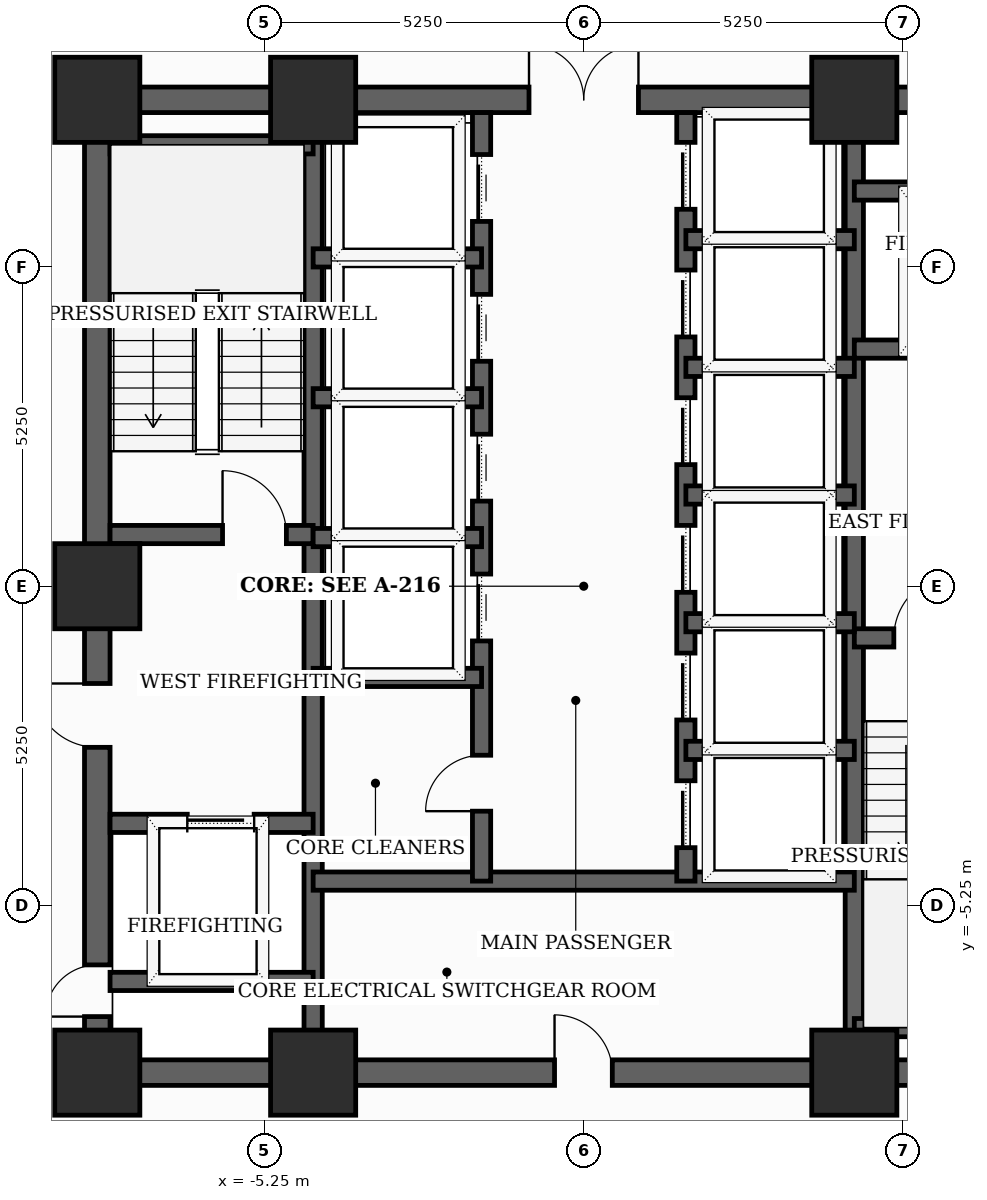
"""IFC4 building model, lengths in metres.
Left out: names, types, materials, properties, quantities, classifications, styles, units other than length and angle.
Written with IfcOpenShell. Run it as: python <this file> out.ifc"""

import sys

from ifc_helpers import new_model, si_unit, direction, frame, frame_2d, origin, origin_2d, place, context, subcontext, project, spatial, rectangle, extrude, element, fill, save


model = new_model("IFC4")
c1 = context("Model", 3, precision=1e-05, world=origin(), true_north=direction((0.0, 1.0)))
c2 = subcontext(c1, "Body", "Model", "MODEL_VIEW")
j1 = project(units=[si_unit("LENGTHUNIT", "METRE"), si_unit("PLANEANGLEUNIT", "RADIAN")], contexts=[c1])
p1 = place(None, origin())
s1 = spatial("IfcSite", under=j1, at=p1, CompositionType="ELEMENT")
p2 = place(p1, origin())
s2 = spatial("IfcBuilding", under=s1, at=p2, CompositionType="ELEMENT")
p3 = place(p2, frame((0.0, 0.0, 90.3)))
s3 = spatial("IfcBuildingStorey", under=s2, at=p3, CompositionType="ELEMENT", Elevation=90.3)
for number, where, z_axis, x_axis in (
    (1, (-8.0, -8.0, 0.0), (0.0, 0.0, 1.0), (1.0, 0.0, 0.0)),
    (2, (-4.45, -8.0, 0.0), (0.0, 0.0, 1.0), (1.0, 0.0, 0.0)),
    (3, (4.45, -8.0, 0.0), (0.0, 0.0, 1.0), (1.0, 0.0, 0.0)),
    (4, (4.45, 8.0, 0.0), (0.0, 0.0, 1.0), (1.0, 0.0, 0.0)),
    (5, (-4.45, 8.0, 0.0), (0.0, 0.0, 1.0), (1.0, 0.0, 0.0)),
    (6, (-8.0, 8.0, 0.0), (0.0, 0.0, 1.0), (1.0, 0.0, 0.0)),
    (7, (-8.0, 0.0, 0.0), (0.0, 0.0, 1.0), (1.0, 0.0, 0.0)),
):
    element("IfcColumn", number, at=place(p3, frame(where, z_axis=z_axis, x_axis=x_axis)), inside=s3, PredefinedType="COLUMN", context=c2, shape_type="SweptSolid", body=[
        extrude(rectangle(XDim=1.4, YDim=1.4, at=origin_2d()), origin(), (0.0, 0.0, 1.0), 3.7),
    ])
p4 = place(p3, frame((-8.0, -8.0, 0.0), z_axis=(0.0, 0.0, 1.0), x_axis=(0.0, 1.0, 0.0)))
e8 = element("IfcWall", 8, at=p4, inside=s3, PredefinedType="SHEAR", context=c2, shape_type="SweptSolid", body=[
    extrude(rectangle(XDim=16.0, YDim=0.42, at=frame_2d((8.0, 0.0))), origin(), (0.0, 0.0, 1.0), 3.5),
])
p5 = place(p4, frame((0.922, 0.0, 0.0)))
e9 = element("IfcOpeningElement", 9, at=p5, cuts=e8, PredefinedType="OPENING", context=c2, shape_type="SweptSolid", body=[
    extrude(rectangle(XDim=0.85, YDim=2.02, at=frame_2d((0.425, 1.01))), frame((0.0, 0.22, 0.0), z_axis=(0.0, -1.0, 0.0), x_axis=(1.0, 0.0, 0.0)), (0.0, 0.0, 1.0), 0.44),
])
p6 = place(p4, frame((5.35, 0.0, 0.0)))
e10 = element("IfcOpeningElement", 10, at=p6, cuts=e8, PredefinedType="OPENING", context=c2, shape_type="SweptSolid", body=[
    extrude(rectangle(XDim=1.05, YDim=2.15, at=frame_2d((0.525, 1.075))), frame((0.0, 0.22, 0.0), z_axis=(0.0, -1.0, 0.0), x_axis=(1.0, 0.0, 0.0)), (0.0, 0.0, 1.0), 0.44),
])
p7 = place(p3, frame((-8.0, -8.0, 0.0), z_axis=(0.0, 0.0, 1.0), x_axis=(1.0, 0.0, 0.0)))
e11 = element("IfcWall", 11, at=p7, inside=s3, PredefinedType="SHEAR", context=c2, shape_type="SweptSolid", body=[
    extrude(rectangle(XDim=16.0, YDim=0.42, at=frame_2d((8.0, 0.0))), origin(), (0.0, 0.0, 1.0), 3.5),
])
p8 = place(p7, frame((7.52, 0.0, 0.0)))
e12 = element("IfcOpeningElement", 12, at=p8, cuts=e11, PredefinedType="OPENING", context=c2, shape_type="SweptSolid", body=[
    extrude(rectangle(XDim=0.95, YDim=2.1, at=frame_2d((0.475, 1.05))), frame((0.0, 0.22, 0.0), z_axis=(0.0, -1.0, 0.0), x_axis=(1.0, 0.0, 0.0)), (0.0, 0.0, 1.0), 0.44),
])
p9 = place(p3, frame((-8.0, 8.0, 0.0), z_axis=(0.0, 0.0, 1.0), x_axis=(1.0, 0.0, 0.0)))
e13 = element("IfcWall", 13, at=p9, inside=s3, PredefinedType="SHEAR", context=c2, shape_type="SweptSolid", body=[
    extrude(rectangle(XDim=16.0, YDim=0.42, at=frame_2d((8.0, 0.0))), origin(), (0.0, 0.0, 1.0), 3.5),
])
p10 = place(p9, frame((7.1, 0.0, 0.0)))
e14 = element("IfcOpeningElement", 14, at=p10, cuts=e13, PredefinedType="OPENING", context=c2, shape_type="SweptSolid", body=[
    extrude(rectangle(XDim=1.8, YDim=2.15, at=frame_2d((0.9, 1.075))), frame((0.0, 0.22, 0.0), z_axis=(0.0, -1.0, 0.0), x_axis=(1.0, 0.0, 0.0)), (0.0, 0.0, 1.0), 0.44),
])
for number, where, z_axis, x_axis in (
    (15, (-4.45, -7.79, 0.0), (0.0, 0.0, 1.0), (0.0, 1.0, 0.0)),
    (16, (4.45, -7.79, 0.0), (0.0, 0.0, 1.0), (0.0, 1.0, 0.0)),
):
    element("IfcWall", number, at=place(p3, frame(where, z_axis=z_axis, x_axis=x_axis)), inside=s3, PredefinedType="SHEAR", context=c2, shape_type="SweptSolid", body=[
        extrude(rectangle(XDim=15.58, YDim=0.3, at=frame_2d((7.79, 0.0))), origin(), (0.0, 0.0, 1.0), 3.5),
    ])
p11 = place(p3, frame((-7.79, 0.85, 0.0), z_axis=(0.0, 0.0, 1.0), x_axis=(1.0, 0.0, 0.0)))
e17 = element("IfcWall", 17, at=p11, inside=s3, PredefinedType="SHEAR", context=c2, shape_type="SweptSolid", body=[
    extrude(rectangle(XDim=3.34, YDim=0.3, at=frame_2d((1.67, 0.0))), origin(), (0.0, 0.0, 1.0), 3.5),
])
p12 = place(p11, frame((1.85, 0.0, 0.0)))
e18 = element("IfcOpeningElement", 18, at=p12, cuts=e17, PredefinedType="OPENING", context=c2, shape_type="SweptSolid", body=[
    extrude(rectangle(XDim=1.05, YDim=2.15, at=frame_2d((0.525, 1.075))), frame((0.0, 0.16, 0.0), z_axis=(0.0, -1.0, 0.0), x_axis=(1.0, 0.0, 0.0)), (0.0, 0.0, 1.0), 0.32),
])
p13 = place(p3, frame((-7.79, 7.26, 0.0), z_axis=(0.0, 0.0, 1.0), x_axis=(1.0, 0.0, 0.0)))
e19 = element("IfcWall", 19, at=p13, inside=s3, PredefinedType="SHEAR", context=c2, shape_type="SweptSolid", body=[
    extrude(rectangle(XDim=3.34, YDim=0.3, at=frame_2d((1.67, 0.0))), origin(), (0.0, 0.0, 1.0), 3.5),
])
p14 = place(p3, frame((4.45, -0.85, 0.0), z_axis=(0.0, 0.0, 1.0), x_axis=(1.0, 0.0, 0.0)))
e20 = element("IfcWall", 20, at=p14, inside=s3, PredefinedType="SHEAR", context=c2, shape_type="SweptSolid", body=[
    extrude(rectangle(XDim=3.34, YDim=0.3, at=frame_2d((1.67, 0.0))), origin(), (0.0, 0.0, 1.0), 3.5),
])
p15 = place(p14, frame((0.65, 0.0, 0.0)))
e21 = element("IfcOpeningElement", 21, at=p15, cuts=e20, PredefinedType="OPENING", context=c2, shape_type="SweptSolid", body=[
    extrude(rectangle(XDim=1.05, YDim=2.15, at=frame_2d((0.525, 1.075))), frame((0.0, 0.16, 0.0), z_axis=(0.0, -1.0, 0.0), x_axis=(1.0, 0.0, 0.0)), (0.0, 0.0, 1.0), 0.32),
])
p16 = place(p3, frame((4.45, -7.26, 0.0), z_axis=(0.0, 0.0, 1.0), x_axis=(1.0, 0.0, 0.0)))
e22 = element("IfcWall", 22, at=p16, inside=s3, PredefinedType="SHEAR", context=c2, shape_type="SweptSolid", body=[
    extrude(rectangle(XDim=3.55, YDim=0.3, at=frame_2d((1.775, 0.0))), origin(), (0.0, 0.0, 1.0), 3.5),
])
p17 = place(p3, frame((-7.79, -3.9, 0.0), z_axis=(0.0, 0.0, 1.0), x_axis=(1.0, 0.0, 0.0)))
e23 = element("IfcWall", 23, at=p17, inside=s3, PredefinedType="SHEAR", context=c2, shape_type="SweptSolid", body=[
    extrude(rectangle(XDim=3.34, YDim=0.3, at=frame_2d((1.67, 0.0))), origin(), (0.0, 0.0, 1.0), 3.5),
])
p18 = place(p17, frame((1.27, 0.0, 0.0)))
e24 = element("IfcOpeningElement", 24, at=p18, cuts=e23, PredefinedType="OPENING", context=c2, shape_type="SweptSolid", body=[
    extrude(rectangle(XDim=1.1, YDim=2.1, at=frame_2d((0.55, 1.05))), frame((0.0, 0.16, 0.0), z_axis=(0.0, -1.0, 0.0), x_axis=(1.0, 0.0, 0.0)), (0.0, 0.0, 1.0), 0.32),
])
p19 = place(p3, frame((-7.79, -6.5, 0.0), z_axis=(0.0, 0.0, 1.0), x_axis=(1.0, 0.0, 0.0)))
e25 = element("IfcWall", 25, at=p19, inside=s3, PredefinedType="SHEAR", context=c2, shape_type="SweptSolid", body=[
    extrude(rectangle(XDim=3.34, YDim=0.3, at=frame_2d((1.67, 0.0))), origin(), (0.0, 0.0, 1.0), 3.5),
])
p20 = place(p3, frame((4.45, 3.9, 0.0), z_axis=(0.0, 0.0, 1.0), x_axis=(1.0, 0.0, 0.0)))
e26 = element("IfcWall", 26, at=p20, inside=s3, PredefinedType="SHEAR", context=c2, shape_type="SweptSolid", body=[
    extrude(rectangle(XDim=3.34, YDim=0.3, at=frame_2d((1.67, 0.0))), origin(), (0.0, 0.0, 1.0), 3.5),
])
p21 = place(p20, frame((1.18, 0.0, 0.0)))
e27 = element("IfcOpeningElement", 27, at=p21, cuts=e26, PredefinedType="OPENING", context=c2, shape_type="SweptSolid", body=[
    extrude(rectangle(XDim=1.1, YDim=2.1, at=frame_2d((0.55, 1.05))), frame((0.0, 0.16, 0.0), z_axis=(0.0, -1.0, 0.0), x_axis=(1.0, 0.0, 0.0)), (0.0, 0.0, 1.0), 0.32),
])
p22 = place(p3, frame((4.45, 6.5, 0.0), z_axis=(0.0, 0.0, 1.0), x_axis=(1.0, 0.0, 0.0)))
e28 = element("IfcWall", 28, at=p22, inside=s3, PredefinedType="SHEAR", context=c2, shape_type="SweptSolid", body=[
    extrude(rectangle(XDim=3.34, YDim=0.3, at=frame_2d((1.67, 0.0))), origin(), (0.0, 0.0, 1.0), 3.5),
])
p23 = place(p3, frame((-4.45, -4.85, 0.0), z_axis=(0.0, 0.0, 1.0), x_axis=(1.0, 0.0, 0.0)))
e29 = element("IfcWall", 29, at=p23, inside=s3, PredefinedType="SHEAR", context=c2, shape_type="SweptSolid", body=[
    extrude(rectangle(XDim=8.9, YDim=0.3, at=frame_2d((4.45, 0.0))), origin(), (0.0, 0.0, 1.0), 3.5),
])
p24 = place(p3, frame((-1.68, -4.85, 0.0), z_axis=(0.0, 0.0, 1.0), x_axis=(0.0, 1.0, 0.0)))
e30 = element("IfcWall", 30, at=p24, inside=s3, PredefinedType="SHEAR", context=c2, shape_type="SweptSolid", body=[
    extrude(rectangle(XDim=12.64, YDim=0.3, at=frame_2d((6.32, 0.0))), origin(), (0.0, 0.0, 1.0), 3.5),
])
p25 = place(p24, frame((3.95, 0.0, 0.0)))
e31 = element("IfcOpeningElement", 31, at=p25, cuts=e30, PredefinedType="OPENING", context=c2, shape_type="SweptSolid", body=[
    extrude(rectangle(XDim=1.1, YDim=2.1, at=frame_2d((0.55, 1.05))), frame((0.0, 0.16, 0.0), z_axis=(0.0, -1.0, 0.0), x_axis=(1.0, 0.0, 0.0)), (0.0, 0.0, 1.0), 0.32),
])
p26 = place(p24, frame((6.25, 0.0, 0.0)))
e32 = element("IfcOpeningElement", 32, at=p26, cuts=e30, PredefinedType="OPENING", context=c2, shape_type="SweptSolid", body=[
    extrude(rectangle(XDim=1.1, YDim=2.1, at=frame_2d((0.55, 1.05))), frame((0.0, 0.16, 0.0), z_axis=(0.0, -1.0, 0.0), x_axis=(1.0, 0.0, 0.0)), (0.0, 0.0, 1.0), 0.32),
])
p27 = place(p24, frame((8.55, 0.0, 0.0)))
e33 = element("IfcOpeningElement", 33, at=p27, cuts=e30, PredefinedType="OPENING", context=c2, shape_type="SweptSolid", body=[
    extrude(rectangle(XDim=1.1, YDim=2.1, at=frame_2d((0.55, 1.05))), frame((0.0, 0.16, 0.0), z_axis=(0.0, -1.0, 0.0), x_axis=(1.0, 0.0, 0.0)), (0.0, 0.0, 1.0), 0.32),
])
p28 = place(p24, frame((10.85, 0.0, 0.0)))
e34 = element("IfcOpeningElement", 34, at=p28, cuts=e30, PredefinedType="OPENING", context=c2, shape_type="SweptSolid", body=[
    extrude(rectangle(XDim=1.1, YDim=2.1, at=frame_2d((0.55, 1.05))), frame((0.0, 0.16, 0.0), z_axis=(0.0, -1.0, 0.0), x_axis=(1.0, 0.0, 0.0)), (0.0, 0.0, 1.0), 0.32),
])
p29 = place(p24, frame((1.15, 0.0, 0.0)))
e35 = element("IfcOpeningElement", 35, at=p29, cuts=e30, PredefinedType="OPENING", context=c2, shape_type="SweptSolid", body=[
    extrude(rectangle(XDim=0.92, YDim=2.1, at=frame_2d((0.46, 1.05))), frame((0.0, 0.16, 0.0), z_axis=(0.0, -1.0, 0.0), x_axis=(1.0, 0.0, 0.0)), (0.0, 0.0, 1.0), 0.32),
])
p30 = place(p3, frame((1.68, -4.85, 0.0), z_axis=(0.0, 0.0, 1.0), x_axis=(0.0, 1.0, 0.0)))
e36 = element("IfcWall", 36, at=p30, inside=s3, PredefinedType="SHEAR", context=c2, shape_type="SweptSolid", body=[
    extrude(rectangle(XDim=12.64, YDim=0.3, at=frame_2d((6.32, 0.0))), origin(), (0.0, 0.0, 1.0), 3.5),
])
p31 = place(p30, frame((0.55, 0.0, 0.0)))
e37 = element("IfcOpeningElement", 37, at=p31, cuts=e36, PredefinedType="OPENING", context=c2, shape_type="SweptSolid", body=[
    extrude(rectangle(XDim=1.1, YDim=2.1, at=frame_2d((0.55, 1.05))), frame((0.0, 0.16, 0.0), z_axis=(0.0, -1.0, 0.0), x_axis=(1.0, 0.0, 0.0)), (0.0, 0.0, 1.0), 0.32),
])
p32 = place(p30, frame((2.65, 0.0, 0.0)))
e38 = element("IfcOpeningElement", 38, at=p32, cuts=e36, PredefinedType="OPENING", context=c2, shape_type="SweptSolid", body=[
    extrude(rectangle(XDim=1.1, YDim=2.1, at=frame_2d((0.55, 1.05))), frame((0.0, 0.16, 0.0), z_axis=(0.0, -1.0, 0.0), x_axis=(1.0, 0.0, 0.0)), (0.0, 0.0, 1.0), 0.32),
])
p33 = place(p30, frame((4.75, 0.0, 0.0)))
e39 = element("IfcOpeningElement", 39, at=p33, cuts=e36, PredefinedType="OPENING", context=c2, shape_type="SweptSolid", body=[
    extrude(rectangle(XDim=1.1, YDim=2.1, at=frame_2d((0.55, 1.05))), frame((0.0, 0.16, 0.0), z_axis=(0.0, -1.0, 0.0), x_axis=(1.0, 0.0, 0.0)), (0.0, 0.0, 1.0), 0.32),
])
p34 = place(p30, frame((6.85, 0.0, 0.0)))
e40 = element("IfcOpeningElement", 40, at=p34, cuts=e36, PredefinedType="OPENING", context=c2, shape_type="SweptSolid", body=[
    extrude(rectangle(XDim=1.1, YDim=2.1, at=frame_2d((0.55, 1.05))), frame((0.0, 0.16, 0.0), z_axis=(0.0, -1.0, 0.0), x_axis=(1.0, 0.0, 0.0)), (0.0, 0.0, 1.0), 0.32),
])
p35 = place(p30, frame((8.95, 0.0, 0.0)))
e41 = element("IfcOpeningElement", 41, at=p35, cuts=e36, PredefinedType="OPENING", context=c2, shape_type="SweptSolid", body=[
    extrude(rectangle(XDim=1.1, YDim=2.1, at=frame_2d((0.55, 1.05))), frame((0.0, 0.16, 0.0), z_axis=(0.0, -1.0, 0.0), x_axis=(1.0, 0.0, 0.0)), (0.0, 0.0, 1.0), 0.32),
])
p36 = place(p30, frame((11.05, 0.0, 0.0)))
e42 = element("IfcOpeningElement", 42, at=p36, cuts=e36, PredefinedType="OPENING", context=c2, shape_type="SweptSolid", body=[
    extrude(rectangle(XDim=1.1, YDim=2.1, at=frame_2d((0.55, 1.05))), frame((0.0, 0.16, 0.0), z_axis=(0.0, -1.0, 0.0), x_axis=(1.0, 0.0, 0.0)), (0.0, 0.0, 1.0), 0.32),
])
for number, where, z_axis, x_axis in (
    (43, (-4.45, -1.5, 0.0), (0.0, 0.0, 1.0), (1.0, 0.0, 0.0)),
    (44, (-4.45, 0.8, 0.0), (0.0, 0.0, 1.0), (1.0, 0.0, 0.0)),
    (45, (-4.45, 3.1, 0.0), (0.0, 0.0, 1.0), (1.0, 0.0, 0.0)),
    (46, (-4.45, 5.4, 0.0), (0.0, 0.0, 1.0), (1.0, 0.0, 0.0)),
    (47, (1.68, 1.5, 0.0), (0.0, 0.0, 1.0), (1.0, 0.0, 0.0)),
    (48, (1.68, 3.6, 0.0), (0.0, 0.0, 1.0), (1.0, 0.0, 0.0)),
    (49, (1.68, 5.7, 0.0), (0.0, 0.0, 1.0), (1.0, 0.0, 0.0)),
    (50, (1.68, -2.7, 0.0), (0.0, 0.0, 1.0), (1.0, 0.0, 0.0)),
    (51, (1.68, -0.6, 0.0), (0.0, 0.0, 1.0), (1.0, 0.0, 0.0)),
):
    element("IfcWall", number, at=place(p3, frame(where, z_axis=z_axis, x_axis=x_axis)), inside=s3, PredefinedType="SHEAR", context=c2, shape_type="SweptSolid", body=[
        extrude(rectangle(XDim=2.77, YDim=0.3, at=frame_2d((1.385, 0.0))), origin(), (0.0, 0.0, 1.0), 3.5),
    ])
p37 = place(p5, origin())
e52 = element("IfcDoor", 52, at=p37, inside=s3, OperationType="SINGLE_SWING_LEFT", PredefinedType="TRAPDOOR", context=c2, shape_type="SweptSolid", body=[
    extrude(rectangle(XDim=0.85, YDim=2.02, at=frame_2d((0.425, 1.01))), frame((0.0, 0.025, 0.0), z_axis=(0.0, -1.0, 0.0), x_axis=(1.0, 0.0, 0.0)), (0.0, 0.0, 1.0), 0.05),
])
fill(e9, e52)
p38 = place(p6, origin())
e53 = element("IfcDoor", 53, at=p38, inside=s3, OperationType="SINGLE_SWING_RIGHT", PredefinedType="DOOR", context=c2, shape_type="SweptSolid", body=[
    extrude(rectangle(XDim=1.05, YDim=2.15, at=frame_2d((0.525, 1.075))), frame((0.0, 0.025, 0.0), z_axis=(0.0, -1.0, 0.0), x_axis=(1.0, 0.0, 0.0)), (0.0, 0.0, 1.0), 0.05),
])
fill(e10, e53)
p39 = place(p8, origin())
e54 = element("IfcDoor", 54, at=p39, inside=s3, OperationType="SINGLE_SWING_LEFT", PredefinedType="DOOR", context=c2, shape_type="SweptSolid", body=[
    extrude(rectangle(XDim=0.95, YDim=2.1, at=frame_2d((0.475, 1.05))), frame((0.0, 0.025, 0.0), z_axis=(0.0, -1.0, 0.0), x_axis=(1.0, 0.0, 0.0)), (0.0, 0.0, 1.0), 0.05),
])
fill(e12, e54)
p40 = place(p10, origin())
e55 = element("IfcDoor", 55, at=p40, inside=s3, OperationType="DOUBLE_DOOR_SINGLE_SWING", PredefinedType="DOOR", context=c2, shape_type="SweptSolid", body=[
    extrude(rectangle(XDim=1.8, YDim=2.15, at=frame_2d((0.9, 1.075))), frame((0.0, 0.025, 0.0), z_axis=(0.0, -1.0, 0.0), x_axis=(1.0, 0.0, 0.0)), (0.0, 0.0, 1.0), 0.05),
])
fill(e14, e55)
p41 = place(p12, origin())
e56 = element("IfcDoor", 56, at=p41, inside=s3, OperationType="SINGLE_SWING_LEFT", PredefinedType="DOOR", context=c2, shape_type="SweptSolid", body=[
    extrude(rectangle(XDim=1.05, YDim=2.15, at=frame_2d((0.525, 1.075))), frame((0.0, 0.025, 0.0), z_axis=(0.0, -1.0, 0.0), x_axis=(1.0, 0.0, 0.0)), (0.0, 0.0, 1.0), 0.05),
])
fill(e18, e56)
p42 = place(p15, origin())
e57 = element("IfcDoor", 57, at=p42, inside=s3, OperationType="SINGLE_SWING_RIGHT", PredefinedType="DOOR", context=c2, shape_type="SweptSolid", body=[
    extrude(rectangle(XDim=1.05, YDim=2.15, at=frame_2d((0.525, 1.075))), frame((0.0, 0.025, 0.0), z_axis=(0.0, -1.0, 0.0), x_axis=(1.0, 0.0, 0.0)), (0.0, 0.0, 1.0), 0.05),
])
fill(e21, e57)
p43 = place(p18, origin())
e58 = element("IfcDoor", 58, at=p43, inside=s3, OperationType="SLIDING_TO_LEFT", PredefinedType="DOOR", context=c2, shape_type="SweptSolid", body=[
    extrude(rectangle(XDim=1.1, YDim=2.1, at=frame_2d((0.55, 1.05))), frame((0.0, 0.025, 0.0), z_axis=(0.0, -1.0, 0.0), x_axis=(1.0, 0.0, 0.0)), (0.0, 0.0, 1.0), 0.05),
])
fill(e24, e58)
p44 = place(p25, origin())
e59 = element("IfcDoor", 59, at=p44, inside=s3, OperationType="SLIDING_TO_LEFT", PredefinedType="DOOR", context=c2, shape_type="SweptSolid", body=[
    extrude(rectangle(XDim=1.1, YDim=2.1, at=frame_2d((0.55, 1.05))), frame((0.0, 0.025, 0.0), z_axis=(0.0, -1.0, 0.0), x_axis=(1.0, 0.0, 0.0)), (0.0, 0.0, 1.0), 0.05),
])
fill(e31, e59)
p45 = place(p26, origin())
e60 = element("IfcDoor", 60, at=p45, inside=s3, OperationType="SLIDING_TO_LEFT", PredefinedType="DOOR", context=c2, shape_type="SweptSolid", body=[
    extrude(rectangle(XDim=1.1, YDim=2.1, at=frame_2d((0.55, 1.05))), frame((0.0, 0.025, 0.0), z_axis=(0.0, -1.0, 0.0), x_axis=(1.0, 0.0, 0.0)), (0.0, 0.0, 1.0), 0.05),
])
fill(e32, e60)
p46 = place(p27, origin())
e61 = element("IfcDoor", 61, at=p46, inside=s3, OperationType="SLIDING_TO_LEFT", PredefinedType="DOOR", context=c2, shape_type="SweptSolid", body=[
    extrude(rectangle(XDim=1.1, YDim=2.1, at=frame_2d((0.55, 1.05))), frame((0.0, 0.025, 0.0), z_axis=(0.0, -1.0, 0.0), x_axis=(1.0, 0.0, 0.0)), (0.0, 0.0, 1.0), 0.05),
])
fill(e33, e61)
p47 = place(p28, origin())
e62 = element("IfcDoor", 62, at=p47, inside=s3, OperationType="SLIDING_TO_LEFT", PredefinedType="DOOR", context=c2, shape_type="SweptSolid", body=[
    extrude(rectangle(XDim=1.1, YDim=2.1, at=frame_2d((0.55, 1.05))), frame((0.0, 0.025, 0.0), z_axis=(0.0, -1.0, 0.0), x_axis=(1.0, 0.0, 0.0)), (0.0, 0.0, 1.0), 0.05),
])
fill(e34, e62)
p48 = place(p29, origin())
e63 = element("IfcDoor", 63, at=p48, inside=s3, OperationType="SINGLE_SWING_LEFT", PredefinedType="DOOR", context=c2, shape_type="SweptSolid", body=[
    extrude(rectangle(XDim=0.92, YDim=2.1, at=frame_2d((0.46, 1.05))), frame((0.0, 0.025, 0.0), z_axis=(0.0, -1.0, 0.0), x_axis=(1.0, 0.0, 0.0)), (0.0, 0.0, 1.0), 0.05),
])
fill(e35, e63)
p49 = place(p31, origin())
e64 = element("IfcDoor", 64, at=p49, inside=s3, OperationType="SLIDING_TO_LEFT", PredefinedType="DOOR", context=c2, shape_type="SweptSolid", body=[
    extrude(rectangle(XDim=1.1, YDim=2.1, at=frame_2d((0.55, 1.05))), frame((0.0, 0.025, 0.0), z_axis=(0.0, -1.0, 0.0), x_axis=(1.0, 0.0, 0.0)), (0.0, 0.0, 1.0), 0.05),
])
fill(e37, e64)
p50 = place(p32, origin())
e65 = element("IfcDoor", 65, at=p50, inside=s3, OperationType="SLIDING_TO_LEFT", PredefinedType="DOOR", context=c2, shape_type="SweptSolid", body=[
    extrude(rectangle(XDim=1.1, YDim=2.1, at=frame_2d((0.55, 1.05))), frame((0.0, 0.025, 0.0), z_axis=(0.0, -1.0, 0.0), x_axis=(1.0, 0.0, 0.0)), (0.0, 0.0, 1.0), 0.05),
])
fill(e38, e65)
p51 = place(p33, origin())
e66 = element("IfcDoor", 66, at=p51, inside=s3, OperationType="SLIDING_TO_LEFT", PredefinedType="DOOR", context=c2, shape_type="SweptSolid", body=[
    extrude(rectangle(XDim=1.1, YDim=2.1, at=frame_2d((0.55, 1.05))), frame((0.0, 0.025, 0.0), z_axis=(0.0, -1.0, 0.0), x_axis=(1.0, 0.0, 0.0)), (0.0, 0.0, 1.0), 0.05),
])
fill(e39, e66)
p52 = place(p34, origin())
e67 = element("IfcDoor", 67, at=p52, inside=s3, OperationType="SLIDING_TO_LEFT", PredefinedType="DOOR", context=c2, shape_type="SweptSolid", body=[
    extrude(rectangle(XDim=1.1, YDim=2.1, at=frame_2d((0.55, 1.05))), frame((0.0, 0.025, 0.0), z_axis=(0.0, -1.0, 0.0), x_axis=(1.0, 0.0, 0.0)), (0.0, 0.0, 1.0), 0.05),
])
fill(e40, e67)
p53 = place(p35, origin())
e68 = element("IfcDoor", 68, at=p53, inside=s3, OperationType="SLIDING_TO_LEFT", PredefinedType="DOOR", context=c2, shape_type="SweptSolid", body=[
    extrude(rectangle(XDim=1.1, YDim=2.1, at=frame_2d((0.55, 1.05))), frame((0.0, 0.025, 0.0), z_axis=(0.0, -1.0, 0.0), x_axis=(1.0, 0.0, 0.0)), (0.0, 0.0, 1.0), 0.05),
])
fill(e41, e68)
p54 = place(p36, origin())
e69 = element("IfcDoor", 69, at=p54, inside=s3, OperationType="SLIDING_TO_LEFT", PredefinedType="DOOR", context=c2, shape_type="SweptSolid", body=[
    extrude(rectangle(XDim=1.1, YDim=2.1, at=frame_2d((0.55, 1.05))), frame((0.0, 0.025, 0.0), z_axis=(0.0, -1.0, 0.0), x_axis=(1.0, 0.0, 0.0)), (0.0, 0.0, 1.0), 0.05),
])
fill(e42, e69)
save(model, sys.argv[1])
